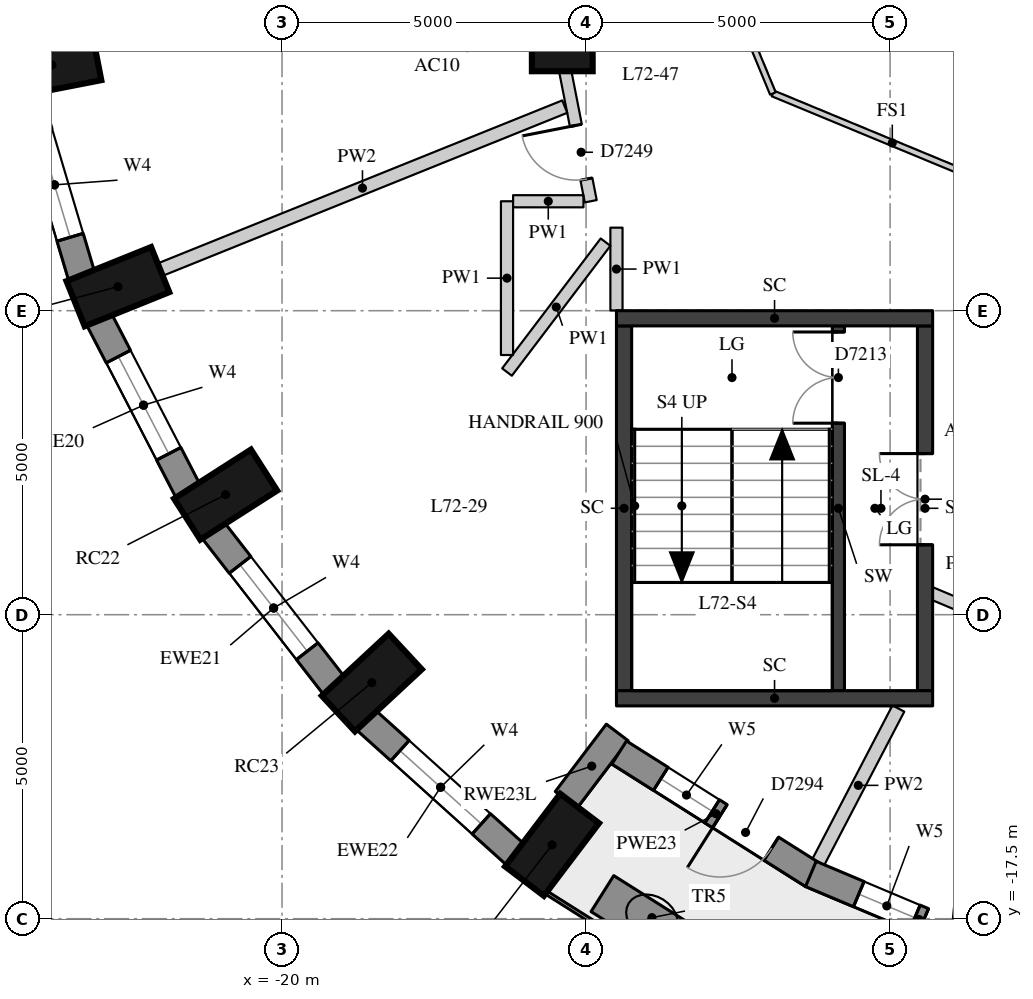
"""IFC4 building model, lengths in metres.
Left out: names, types, materials, properties, quantities, classifications, styles, units other than length and angle.
Written with IfcOpenShell. Run it as: python <this file> out.ifc"""

import sys

from ifc_helpers import new_model, si_unit, direction, frame, frame_2d, origin, origin_2d, place, context, subcontext, project, spatial, rectangle, extrude, element, fill, save


model = new_model("IFC4")
c1 = context("Model", 3, precision=1e-05, world=origin(), true_north=direction((0.0, 1.0)))
c2 = subcontext(c1, "Body", "Model", "MODEL_VIEW")
j1 = project(units=[si_unit("LENGTHUNIT", "METRE"), si_unit("PLANEANGLEUNIT", "RADIAN")], contexts=[c1])
p1 = place(None, origin())
s1 = spatial("IfcSite", under=j1, at=p1, CompositionType="ELEMENT")
p2 = place(p1, origin())
s2 = spatial("IfcBuilding", under=s1, at=p2, CompositionType="ELEMENT")
p3 = place(p2, frame((0.0, 0.0, 253.1)))
s3 = spatial("IfcBuildingStorey", under=s2, at=p3, CompositionType="ELEMENT", Elevation=253.1)
for number, where, z_axis, x_axis in (
    (1, (-23.785, -3.459, 0.0), (0.0, 0.0, 1.0), (-0.981, -0.192, 0.0)),
    (2, (-22.7, -7.105, 0.0), (0.0, 0.0, 1.0), (-0.928, -0.374, 0.0)),
    (3, (-20.928, -10.525, 0.0), (0.0, 0.0, 1.0), (-0.843, -0.539, 0.0)),
    (4, (-18.523, -13.616, 0.0), (0.0, 0.0, 1.0), (-0.733, -0.681, 0.0)),
    (5, (-15.559, -16.285, 0.0), (0.0, 0.0, 1.0), (-0.604, -0.797, 0.0)),
):
    element("IfcColumn", number, at=place(p3, frame(where, z_axis=z_axis, x_axis=x_axis)), inside=s3, PredefinedType="COLUMN", context=c2, shape_type="SweptSolid", body=[
        extrude(rectangle(XDim=1.5, YDim=0.8, at=origin_2d()), origin(), (0.0, 0.0, 1.0), 3.3),
    ])
p4 = place(p3, frame((-15.391, -3.062, 0.0), z_axis=(0.0, 0.0, 1.0), x_axis=(1.0, 0.0, 0.0)))
e6 = element("IfcColumn", 6, at=p4, inside=s3, PredefinedType="COLUMN", context=c2, shape_type="SweptSolid", body=[
    extrude(rectangle(XDim=1.0, YDim=1.0, at=origin_2d()), origin(), (0.0, 0.0, 1.0), 3.3),
])
p5 = place(p3, frame((-24.19, -3.926, 0.0), z_axis=(0.0, 0.0, 1.0), x_axis=(0.285263800865, -0.958449040855, 0.0)))
e7 = element("IfcWall", 7, at=p5, inside=s3, PredefinedType="SOLIDWALL", context=c2, shape_type="SweptSolid", body=[
    extrude(rectangle(XDim=3.139, YDim=0.45, at=frame_2d((1.57, 0.0))), origin(), (0.0, 0.0, 1.0), 3.02),
])
p6 = place(p5, frame((0.67, 0.0, 0.4)))
e8 = element("IfcOpeningElement", 8, at=p6, cuts=e7, PredefinedType="OPENING", context=c2, shape_type="SweptSolid", body=[
    extrude(rectangle(XDim=1.8, YDim=1.75, at=frame_2d((0.9, 0.875))), frame((0.0, 0.235, 0.0), z_axis=(0.0, -1.0, 0.0), x_axis=(1.0, 0.0, 0.0)), (0.0, 0.0, 1.0), 0.47),
])
p7 = place(p3, frame((-23.01, -7.64, 0.0), z_axis=(0.0, 0.0, 1.0), x_axis=(0.459921155255, -0.887959757505, 0.0)))
e9 = element("IfcWall", 9, at=p7, inside=s3, PredefinedType="SOLIDWALL", context=c2, shape_type="SweptSolid", body=[
    extrude(rectangle(XDim=3.186, YDim=0.45, at=frame_2d((1.593, 0.0))), origin(), (0.0, 0.0, 1.0), 3.02),
])
p8 = place(p7, frame((0.693, 0.0, 0.4)))
e10 = element("IfcOpeningElement", 10, at=p8, cuts=e9, PredefinedType="OPENING", context=c2, shape_type="SweptSolid", body=[
    extrude(rectangle(XDim=1.8, YDim=1.75, at=frame_2d((0.9, 0.875))), frame((0.0, 0.235, 0.0), z_axis=(0.0, -1.0, 0.0), x_axis=(1.0, 0.0, 0.0)), (0.0, 0.0, 1.0), 0.47),
])
p9 = place(p3, frame((-21.135, -11.109, 0.0), z_axis=(0.0, 0.0, 1.0), x_axis=(0.613898970825, -0.789384604372, 0.0)))
e11 = element("IfcWall", 11, at=p9, inside=s3, PredefinedType="SOLIDWALL", context=c2, shape_type="SweptSolid", body=[
    extrude(rectangle(XDim=3.247, YDim=0.45, at=frame_2d((1.624, 0.0))), origin(), (0.0, 0.0, 1.0), 3.02),
])
p10 = place(p9, frame((0.724, 0.0, 0.4)))
e12 = element("IfcOpeningElement", 12, at=p10, cuts=e11, PredefinedType="OPENING", context=c2, shape_type="SweptSolid", body=[
    extrude(rectangle(XDim=1.8, YDim=1.75, at=frame_2d((0.9, 0.875))), frame((0.0, 0.235, 0.0), z_axis=(0.0, -1.0, 0.0), x_axis=(1.0, 0.0, 0.0)), (0.0, 0.0, 1.0), 0.47),
])
p11 = place(p3, frame((-18.624, -14.229, 0.0), z_axis=(0.0, 0.0, 1.0), x_axis=(0.743166014219, -0.669107073128, 0.0)))
e13 = element("IfcWall", 13, at=p11, inside=s3, PredefinedType="SOLIDWALL", context=c2, shape_type="SweptSolid", body=[
    extrude(rectangle(XDim=3.316, YDim=0.45, at=frame_2d((1.658, 0.0))), origin(), (0.0, 0.0, 1.0), 3.02),
])
p12 = place(p11, frame((0.758, 0.0, 0.4)))
e14 = element("IfcOpeningElement", 14, at=p12, cuts=e13, PredefinedType="OPENING", context=c2, shape_type="SweptSolid", body=[
    extrude(rectangle(XDim=1.8, YDim=1.75, at=frame_2d((0.9, 0.875))), frame((0.0, 0.235, 0.0), z_axis=(0.0, -1.0, 0.0), x_axis=(1.0, 0.0, 0.0)), (0.0, 0.0, 1.0), 0.47),
])
p13 = place(p3, frame((-15.327, -15.545, 0.0), z_axis=(0.0, 0.0, 1.0), x_axis=(0.604148273711, 0.79687192407, 0.0)))
e15 = element("IfcWall", 15, at=p13, inside=s3, PredefinedType="SOLIDWALL", context=c2, shape_type="SweptSolid", body=[
    extrude(rectangle(XDim=1.391, YDim=0.45, at=frame_2d((0.695, 0.0))), origin(), (0.0, 0.0, 1.0), 2.57),
])
p14 = place(p3, frame((-14.455, -14.767, 0.0), z_axis=(0.0, 0.0, 1.0), x_axis=(0.845183955488, -0.534475519912, 0.0)))
e16 = element("IfcWall", 16, at=p14, inside=s3, PredefinedType="SOLIDWALL", context=c2, shape_type="SweptSolid", body=[
    extrude(rectangle(XDim=3.769, YDim=0.45, at=frame_2d((1.884, 0.0))), origin(), (0.0, 0.0, 1.0), 3.02),
])
p15 = place(p14, frame((0.809, 0.0, 0.4)))
e17 = element("IfcOpeningElement", 17, at=p15, cuts=e16, PredefinedType="OPENING", context=c2, shape_type="SweptSolid", body=[
    extrude(rectangle(XDim=1.0, YDim=1.75, at=frame_2d((0.5, 0.875))), frame((0.0, 0.235, 0.0), z_axis=(0.0, -1.0, 0.0), x_axis=(1.0, 0.0, 0.0)), (0.0, 0.0, 1.0), 0.47),
])
p16 = place(p14, frame((1.959, 0.0, 0.0)))
e18 = element("IfcOpeningElement", 18, at=p16, cuts=e16, PredefinedType="OPENING", context=c2, shape_type="SweptSolid", body=[
    extrude(rectangle(XDim=1.0, YDim=2.15, at=frame_2d((0.5, 1.075))), frame((0.0, 0.235, 0.0), z_axis=(0.0, -1.0, 0.0), x_axis=(1.0, 0.0, 0.0)), (0.0, 0.0, 1.0), 0.47),
])
p17 = place(p3, frame((-11.303, -16.764, 0.0), z_axis=(0.0, 0.0, 1.0), x_axis=(0.921625850704, -0.388079619813, 0.0)))
e19 = element("IfcWall", 19, at=p17, inside=s3, PredefinedType="SOLIDWALL", context=c2, shape_type="SweptSolid", body=[
    extrude(rectangle(XDim=3.86, YDim=0.45, at=frame_2d((1.93, 0.0))), origin(), (0.0, 0.0, 1.0), 3.02),
])
p18 = place(p17, frame((0.855, 0.0, 0.4)))
e20 = element("IfcOpeningElement", 20, at=p18, cuts=e19, PredefinedType="OPENING", context=c2, shape_type="SweptSolid", body=[
    extrude(rectangle(XDim=1.0, YDim=1.75, at=frame_2d((0.5, 0.875))), frame((0.0, 0.235, 0.0), z_axis=(0.0, -1.0, 0.0), x_axis=(1.0, 0.0, 0.0)), (0.0, 0.0, 1.0), 0.47),
])
p19 = place(p17, frame((2.005, 0.0, 0.0)))
e21 = element("IfcOpeningElement", 21, at=p19, cuts=e19, PredefinedType="OPENING", context=c2, shape_type="SweptSolid", body=[
    extrude(rectangle(XDim=1.0, YDim=2.15, at=frame_2d((0.5, 1.075))), frame((0.0, 0.235, 0.0), z_axis=(0.0, -1.0, 0.0), x_axis=(1.0, 0.0, 0.0)), (0.0, 0.0, 1.0), 0.47),
])
p20 = place(p3, frame((-14.731, -17.087, 0.0), z_axis=(0.0, 0.0, 1.0), x_axis=(0.845926932753, -0.533298813465, 0.0)))
e22 = element("IfcWall", 22, at=p20, inside=s3, PredefinedType="USERDEFINED", context=c2, shape_type="SweptSolid", body=[
    extrude(rectangle(XDim=1.8, YDim=0.7, at=frame_2d((0.9, 0.0))), origin(), (0.0, 0.0, 1.0), 0.75),
])
p21 = place(p3, frame((-10.85, -13.75, 0.0), z_axis=(0.0, 0.0, 1.0), x_axis=(0.0, 1.0, 0.0)))
e23 = element("IfcWall", 23, at=p21, inside=s3, PredefinedType="SHEAR", context=c2, shape_type="SweptSolid", body=[
    extrude(rectangle(XDim=6.0, YDim=0.2, at=frame_2d((3.0, 0.0))), origin(), (0.0, 0.0, 1.0), 3.02),
])
p22 = place(p21, frame((4.4, 0.0, 0.0)))
e24 = element("IfcOpeningElement", 24, at=p22, cuts=e23, PredefinedType="OPENING", context=c2, shape_type="SweptSolid", body=[
    extrude(rectangle(XDim=1.5, YDim=2.1, at=frame_2d((0.75, 1.05))), frame((0.0, 0.11, 0.0), z_axis=(0.0, -1.0, 0.0), x_axis=(1.0, 0.0, 0.0)), (0.0, 0.0, 1.0), 0.22),
])
p23 = place(p3, frame((-14.375, -13.75, -0.28), z_axis=(0.0, 0.0, 1.0), x_axis=(0.0, 1.0, 0.0)))
e25 = element("IfcWall", 25, at=p23, inside=s3, PredefinedType="SHEAR", context=c2, shape_type="SweptSolid", body=[
    extrude(rectangle(XDim=6.0, YDim=0.25, at=frame_2d((3.0, 0.0))), origin(), (0.0, 0.0, 1.0), 3.3),
])
p24 = place(p3, frame((-9.425, -13.75, -0.28), z_axis=(0.0, 0.0, 1.0), x_axis=(0.0, 1.0, 0.0)))
e26 = element("IfcWall", 26, at=p24, inside=s3, PredefinedType="SHEAR", context=c2, shape_type="SweptSolid", body=[
    extrude(rectangle(XDim=6.0, YDim=0.25, at=frame_2d((3.0, 0.0))), origin(), (0.0, 0.0, 1.0), 3.3),
])
p25 = place(p24, frame((2.4, 0.0, 0.28)))
e27 = element("IfcOpeningElement", 27, at=p25, cuts=e26, PredefinedType="OPENING", context=c2, shape_type="SweptSolid", body=[
    extrude(rectangle(XDim=1.5, YDim=2.1, at=frame_2d((0.75, 1.05))), frame((0.0, 0.135, 0.0), z_axis=(0.0, -1.0, 0.0), x_axis=(1.0, 0.0, 0.0)), (0.0, 0.0, 1.0), 0.27),
])
for number, where, z_axis, x_axis in (
    (28, (-14.5, -7.625, -0.28), (0.0, 0.0, 1.0), (1.0, 0.0, 0.0)),
    (29, (-14.5, -13.875, -0.28), (0.0, 0.0, 1.0), (1.0, 0.0, 0.0)),
):
    element("IfcWall", number, at=place(p3, frame(where, z_axis=z_axis, x_axis=x_axis)), inside=s3, PredefinedType="SHEAR", context=c2, shape_type="SweptSolid", body=[
        extrude(rectangle(XDim=5.2, YDim=0.25, at=frame_2d((2.6, 0.0))), origin(), (0.0, 0.0, 1.0), 3.3),
    ])
p26 = place(p3, frame((-14.923, -5.7, 0.0), z_axis=(0.0, 0.0, 1.0), x_axis=(-0.192536596074, 0.981289793676, 0.0)))
e30 = element("IfcWall", 30, at=p26, inside=s3, PredefinedType="PARTITIONING", context=c2, shape_type="SweptSolid", body=[
    extrude(rectangle(XDim=6.115, YDim=0.2, at=frame_2d((3.057, 0.0))), origin(), (0.0, 0.0, 1.0), 2.52),
])
p27 = place(p26, frame((3.699, 0.0, 0.0)))
e31 = element("IfcOpeningElement", 31, at=p27, cuts=e30, PredefinedType="OPENING", context=c2, shape_type="SweptSolid", body=[
    extrude(rectangle(XDim=1.1, YDim=2.1, at=frame_2d((0.55, 1.05))), frame((0.0, 0.11, 0.0), z_axis=(0.0, -1.0, 0.0), x_axis=(1.0, 0.0, 0.0)), (0.0, 0.0, 1.0), 0.22),
])
p28 = place(p26, frame((0.372, 0.0, 0.0)))
e32 = element("IfcOpeningElement", 32, at=p28, cuts=e30, PredefinedType="OPENING", context=c2, shape_type="SweptSolid", body=[
    extrude(rectangle(XDim=0.9, YDim=2.1, at=frame_2d((0.45, 1.05))), frame((0.0, 0.11, 0.0), z_axis=(0.0, -1.0, 0.0), x_axis=(1.0, 0.0, 0.0)), (0.0, 0.0, 1.0), 0.22),
])
p29 = place(p3, frame((-7.846, -12.766, 0.0), z_axis=(0.0, 0.0, 1.0), x_axis=(-0.921813756196, 0.387633072489, 0.0)))
e33 = element("IfcWall", 33, at=p29, inside=s3, PredefinedType="PARTITIONING", context=c2, shape_type="SweptSolid", body=[
    extrude(rectangle(XDim=1.751, YDim=0.2, at=frame_2d((0.875, 0.0))), origin(), (0.0, 0.0, 1.0), 2.57),
])
p30 = place(p3, frame((-14.5, -7.496, 0.0), z_axis=(0.0, 0.0, 1.0), x_axis=(0.0, 1.0, 0.0)))
e34 = element("IfcWall", 34, at=p30, inside=s3, PredefinedType="PARTITIONING", context=c2, shape_type="SweptSolid", body=[
    extrude(rectangle(XDim=1.362, YDim=0.2, at=frame_2d((0.681, 0.0))), origin(), (0.0, 0.0, 1.0), 3.02),
])
p31 = place(p3, frame((-14.679, -6.372, 0.0), z_axis=(0.0, 0.0, 1.0), x_axis=(-0.604258962547, -0.796787993247, 0.0)))
e35 = element("IfcWall", 35, at=p31, inside=s3, PredefinedType="PARTITIONING", context=c2, shape_type="SweptSolid", body=[
    extrude(rectangle(XDim=2.682, YDim=0.2, at=frame_2d((1.341, 0.0))), origin(), (0.0, 0.0, 1.0), 3.02),
])
p32 = place(p3, frame((-16.3, -8.229, 0.0), z_axis=(0.0, 0.0, 1.0), x_axis=(0.0, 1.0, 0.0)))
e36 = element("IfcWall", 36, at=p32, inside=s3, PredefinedType="PARTITIONING", context=c2, shape_type="SweptSolid", body=[
    extrude(rectangle(XDim=2.529, YDim=0.2, at=frame_2d((1.265, 0.0))), origin(), (0.0, 0.0, 1.0), 3.02),
])
p33 = place(p3, frame((-16.2, -5.7, 0.0), z_axis=(0.0, 0.0, 1.0), x_axis=(1.0, 0.0, 0.0)))
e37 = element("IfcWall", 37, at=p33, inside=s3, PredefinedType="PARTITIONING", context=c2, shape_type="SweptSolid", body=[
    extrude(rectangle(XDim=1.157, YDim=0.2, at=frame_2d((0.579, 0.0))), origin(), (0.0, 0.0, 1.0), 3.02),
])
p34 = place(p3, frame((-22.004, -6.824, 0.0), z_axis=(0.0, 0.0, 1.0), x_axis=(0.927530164265, 0.373748303513, 0.0)))
e38 = element("IfcWall", 38, at=p34, inside=s3, PredefinedType="PARTITIONING", context=c2, shape_type="SweptSolid", body=[
    extrude(rectangle(XDim=7.174, YDim=0.22, at=frame_2d((3.587, 0.0))), origin(), (0.0, 0.0, 1.0), 3.02),
])
p35 = place(p3, frame((-11.181, -16.571, 0.0), z_axis=(0.0, 0.0, 1.0), x_axis=(0.462325972726, 0.886710039947, 0.0)))
e39 = element("IfcWall", 39, at=p35, inside=s3, PredefinedType="PARTITIONING", context=c2, shape_type="SweptSolid", body=[
    extrude(rectangle(XDim=2.851, YDim=0.22, at=frame_2d((1.425, 0.0))), origin(), (0.0, 0.0, 1.0), 3.02),
])
for number, where, z_axis, x_axis in (
    (40, (-8.0, -5.554, 0.0), (0.0, 0.0, 1.0), (-0.924, 0.383, 0.0)),
    (41, (-11.927, -3.927, 0.0), (0.0, 0.0, 1.0), (-0.383, 0.924, 0.0)),
):
    element("IfcWall", number, at=place(p3, frame(where, z_axis=z_axis, x_axis=x_axis)), inside=s3, PredefinedType="PARTITIONING", context=c2, shape_type="SweptSolid", body=[
        extrude(rectangle(XDim=4.251, YDim=0.1, at=frame_2d((2.125, 0.0))), origin(), (0.0, 0.0, 1.0), 3.02),
    ])
p36 = place(p6, origin())
e42 = element("IfcWindow", 42, at=p36, inside=s3, PartitioningType="SINGLE_PANEL", PredefinedType="WINDOW", context=c2, shape_type="SweptSolid", body=[
    extrude(rectangle(XDim=1.8, YDim=1.75, at=frame_2d((0.9, 0.875))), frame((0.0, 0.035, 0.0), z_axis=(0.0, -1.0, 0.0), x_axis=(1.0, 0.0, 0.0)), (0.0, 0.0, 1.0), 0.06),
])
fill(e8, e42)
p37 = place(p8, origin())
e43 = element("IfcWindow", 43, at=p37, inside=s3, PartitioningType="SINGLE_PANEL", PredefinedType="WINDOW", context=c2, shape_type="SweptSolid", body=[
    extrude(rectangle(XDim=1.8, YDim=1.75, at=frame_2d((0.9, 0.875))), frame((0.0, 0.035, 0.0), z_axis=(0.0, -1.0, 0.0), x_axis=(1.0, 0.0, 0.0)), (0.0, 0.0, 1.0), 0.06),
])
fill(e10, e43)
p38 = place(p10, origin())
e44 = element("IfcWindow", 44, at=p38, inside=s3, PartitioningType="SINGLE_PANEL", PredefinedType="WINDOW", context=c2, shape_type="SweptSolid", body=[
    extrude(rectangle(XDim=1.8, YDim=1.75, at=frame_2d((0.9, 0.875))), frame((0.0, 0.035, 0.0), z_axis=(0.0, -1.0, 0.0), x_axis=(1.0, 0.0, 0.0)), (0.0, 0.0, 1.0), 0.06),
])
fill(e12, e44)
p39 = place(p12, origin())
e45 = element("IfcWindow", 45, at=p39, inside=s3, PartitioningType="SINGLE_PANEL", PredefinedType="WINDOW", context=c2, shape_type="SweptSolid", body=[
    extrude(rectangle(XDim=1.8, YDim=1.75, at=frame_2d((0.9, 0.875))), frame((0.0, 0.035, 0.0), z_axis=(0.0, -1.0, 0.0), x_axis=(1.0, 0.0, 0.0)), (0.0, 0.0, 1.0), 0.06),
])
fill(e14, e45)
p40 = place(p15, origin())
e46 = element("IfcWindow", 46, at=p40, inside=s3, PartitioningType="SINGLE_PANEL", PredefinedType="WINDOW", context=c2, shape_type="SweptSolid", body=[
    extrude(rectangle(XDim=1.0, YDim=1.75, at=frame_2d((0.5, 0.875))), frame((0.0, 0.035, 0.0), z_axis=(0.0, -1.0, 0.0), x_axis=(1.0, 0.0, 0.0)), (0.0, 0.0, 1.0), 0.06),
])
fill(e17, e46)
p41 = place(p16, frame((1.0, 0.0, 0.0), z_axis=(0.0, 0.0, 1.0), x_axis=(-1.0, 0.0, 0.0)))
e47 = element("IfcDoor", 47, at=p41, inside=s3, OperationType="SINGLE_SWING_RIGHT", PredefinedType="DOOR", context=c2, shape_type="SweptSolid", body=[
    extrude(rectangle(XDim=1.0, YDim=2.15, at=frame_2d((0.5, 1.075))), frame((0.0, 0.075, 0.0), z_axis=(0.0, -1.0, 0.0), x_axis=(1.0, 0.0, 0.0)), (0.0, 0.0, 1.0), 0.05),
])
fill(e18, e47)
p42 = place(p18, origin())
e48 = element("IfcWindow", 48, at=p42, inside=s3, PartitioningType="SINGLE_PANEL", PredefinedType="WINDOW", context=c2, shape_type="SweptSolid", body=[
    extrude(rectangle(XDim=1.0, YDim=1.75, at=frame_2d((0.5, 0.875))), frame((0.0, 0.035, 0.0), z_axis=(0.0, -1.0, 0.0), x_axis=(1.0, 0.0, 0.0)), (0.0, 0.0, 1.0), 0.06),
])
fill(e20, e48)
p43 = place(p22, origin())
e49 = element("IfcDoor", 49, at=p43, inside=s3, OperationType="DOUBLE_DOOR_SINGLE_SWING", PredefinedType="DOOR", context=c2, shape_type="SweptSolid", body=[
    extrude(rectangle(XDim=1.5, YDim=2.1, at=frame_2d((0.75, 1.05))), frame((0.0, 0.025, 0.0), z_axis=(0.0, -1.0, 0.0), x_axis=(1.0, 0.0, 0.0)), (0.0, 0.0, 1.0), 0.05),
])
fill(e24, e49)
p44 = place(p25, origin())
e50 = element("IfcDoor", 50, at=p44, inside=s3, OperationType="DOUBLE_DOOR_SINGLE_SWING", PredefinedType="DOOR", context=c2, shape_type="SweptSolid", body=[
    extrude(rectangle(XDim=1.5, YDim=2.1, at=frame_2d((0.75, 1.05))), frame((0.0, 0.025, 0.0), z_axis=(0.0, -1.0, 0.0), x_axis=(1.0, 0.0, 0.0)), (0.0, 0.0, 1.0), 0.05),
])
fill(e27, e50)
p45 = place(p28, origin())
e51 = element("IfcDoor", 51, at=p45, inside=s3, OperationType="SINGLE_SWING_RIGHT", PredefinedType="DOOR", context=c2, shape_type="SweptSolid", body=[
    extrude(rectangle(XDim=0.9, YDim=2.1, at=frame_2d((0.45, 1.05))), frame((0.0, 0.025, 0.0), z_axis=(0.0, -1.0, 0.0), x_axis=(1.0, 0.0, 0.0)), (0.0, 0.0, 1.0), 0.05),
])
fill(e32, e51)
save(model, sys.argv[1])
